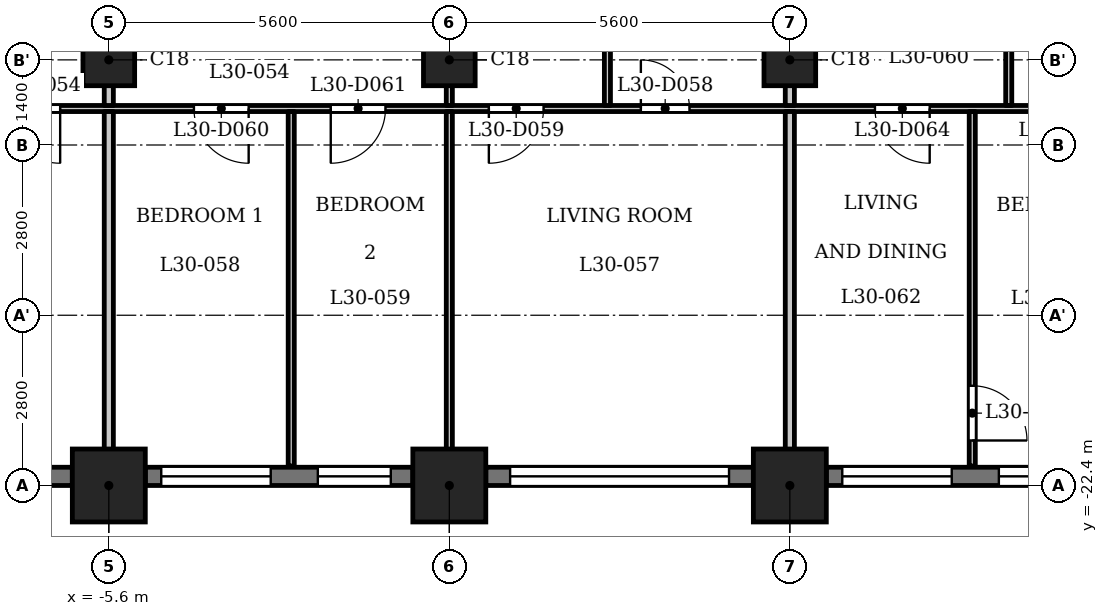
"""IFC4 building model, lengths in metres.
Left out: names, types, materials, properties, quantities, classifications, styles, units other than length and angle.
Written with IfcOpenShell. Run it as: python <this file> out.ifc"""

import sys

from ifc_helpers import new_model, si_unit, direction, frame, frame_2d, origin, origin_2d, place, context, subcontext, project, spatial, rectangle, extrude, element, fill, save


model = new_model("IFC4")
c1 = context("Model", 3, precision=1e-05, world=origin(), true_north=direction((0.0, 1.0)))
c2 = subcontext(c1, "Body", "Model", "MODEL_VIEW")
j1 = project(units=[si_unit("LENGTHUNIT", "METRE"), si_unit("PLANEANGLEUNIT", "RADIAN")], contexts=[c1])
p1 = place(None, origin())
s1 = spatial("IfcSite", under=j1, at=p1, CompositionType="ELEMENT")
p2 = place(p1, origin())
s2 = spatial("IfcBuilding", under=s1, at=p2, CompositionType="ELEMENT")
p3 = place(p2, frame((0.0, 0.0, 118.3)))
s3 = spatial("IfcBuildingStorey", under=s2, at=p3, CompositionType="ELEMENT", Elevation=118.3)
for number, where, z_axis, x_axis in (
    (1, (-5.6, -22.4, 0.0), (0.0, 0.0, 1.0), (1.0, 0.0, 0.0)),
    (2, (0.0, -22.4, 0.0), (0.0, 0.0, 1.0), (1.0, 0.0, 0.0)),
    (3, (5.6, -22.4, 0.0), (0.0, 0.0, 1.0), (1.0, 0.0, 0.0)),
):
    element("IfcColumn", number, at=place(p3, frame(where, z_axis=z_axis, x_axis=x_axis)), inside=s3, PredefinedType="COLUMN", context=c2, shape_type="SweptSolid", body=[
        extrude(rectangle(XDim=1.2, YDim=1.2, at=origin_2d()), origin(), (0.0, 0.0, 1.0), 3.5),
    ])
for number, where, z_axis, x_axis in (
    (4, (-5.6, -15.4, 0.0), (0.0, 0.0, 1.0), (1.0, 0.0, 0.0)),
    (5, (0.0, -15.4, 0.0), (0.0, 0.0, 1.0), (1.0, 0.0, 0.0)),
    (6, (5.6, -15.4, 0.0), (0.0, 0.0, 1.0), (1.0, 0.0, 0.0)),
):
    element("IfcColumn", number, at=place(p3, frame(where, z_axis=z_axis, x_axis=x_axis)), inside=s3, PredefinedType="COLUMN", context=c2, shape_type="SweptSolid", body=[
        extrude(rectangle(XDim=0.85, YDim=0.85, at=origin_2d()), origin(), (0.0, 0.0, 1.0), 3.5),
    ])
p4 = place(p3, frame((-10.6, -22.25, 0.0), z_axis=(0.0, 0.0, 1.0), x_axis=(1.0, 0.0, 0.0)))
e7 = element("IfcWall", 7, at=p4, inside=s3, PredefinedType="SOLIDWALL", context=c2, shape_type="SweptSolid", body=[
    extrude(rectangle(XDim=4.4, YDim=0.3, at=frame_2d((2.2, 0.0))), origin(), (0.0, 0.0, 1.0), 2.4),
])
p5 = place(p4, frame((0.4, 0.0, 1.2)))
e8 = element("IfcOpeningElement", 8, at=p5, cuts=e7, PredefinedType="OPENING", context=c2, shape_type="SweptSolid", body=[
    extrude(rectangle(XDim=3.6, YDim=0.95, at=frame_2d((1.8, 0.475))), frame((0.0, 0.16, 0.0), z_axis=(0.0, -1.0, 0.0), x_axis=(1.0, 0.0, 0.0)), (0.0, 0.0, 1.0), 0.32),
])
p6 = place(p3, frame((-5.0, -22.25, 0.0), z_axis=(0.0, 0.0, 1.0), x_axis=(1.0, 0.0, 0.0)))
e9 = element("IfcWall", 9, at=p6, inside=s3, PredefinedType="SOLIDWALL", context=c2, shape_type="SweptSolid", body=[
    extrude(rectangle(XDim=4.4, YDim=0.3, at=frame_2d((2.2, 0.0))), origin(), (0.0, 0.0, 1.0), 2.4),
])
p7 = place(p6, frame((0.262, 0.0, 0.9)))
e10 = element("IfcOpeningElement", 10, at=p7, cuts=e9, PredefinedType="OPENING", context=c2, shape_type="SweptSolid", body=[
    extrude(rectangle(XDim=1.8, YDim=1.25, at=frame_2d((0.9, 0.625))), frame((0.0, 0.16, 0.0), z_axis=(0.0, -1.0, 0.0), x_axis=(1.0, 0.0, 0.0)), (0.0, 0.0, 1.0), 0.32),
])
p8 = place(p6, frame((2.837, 0.0, 0.6)))
e11 = element("IfcOpeningElement", 11, at=p8, cuts=e9, PredefinedType="OPENING", context=c2, shape_type="SweptSolid", body=[
    extrude(rectangle(XDim=1.2, YDim=1.55, at=frame_2d((0.6, 0.775))), frame((0.0, 0.16, 0.0), z_axis=(0.0, -1.0, 0.0), x_axis=(1.0, 0.0, 0.0)), (0.0, 0.0, 1.0), 0.32),
])
p9 = place(p3, frame((0.6, -22.25, 0.0), z_axis=(0.0, 0.0, 1.0), x_axis=(1.0, 0.0, 0.0)))
e12 = element("IfcWall", 12, at=p9, inside=s3, PredefinedType="SOLIDWALL", context=c2, shape_type="SweptSolid", body=[
    extrude(rectangle(XDim=4.4, YDim=0.3, at=frame_2d((2.2, 0.0))), origin(), (0.0, 0.0, 1.0), 2.4),
])
p10 = place(p9, frame((0.4, 0.0, 1.2)))
e13 = element("IfcOpeningElement", 13, at=p10, cuts=e12, PredefinedType="OPENING", context=c2, shape_type="SweptSolid", body=[
    extrude(rectangle(XDim=3.6, YDim=0.95, at=frame_2d((1.8, 0.475))), frame((0.0, 0.16, 0.0), z_axis=(0.0, -1.0, 0.0), x_axis=(1.0, 0.0, 0.0)), (0.0, 0.0, 1.0), 0.32),
])
p11 = place(p3, frame((6.2, -22.25, 0.0), z_axis=(0.0, 0.0, 1.0), x_axis=(1.0, 0.0, 0.0)))
e14 = element("IfcWall", 14, at=p11, inside=s3, PredefinedType="SOLIDWALL", context=c2, shape_type="SweptSolid", body=[
    extrude(rectangle(XDim=4.4, YDim=0.3, at=frame_2d((2.2, 0.0))), origin(), (0.0, 0.0, 1.0), 2.4),
])
p12 = place(p11, frame((0.262, 0.0, 0.9)))
e15 = element("IfcOpeningElement", 15, at=p12, cuts=e14, PredefinedType="OPENING", context=c2, shape_type="SweptSolid", body=[
    extrude(rectangle(XDim=1.8, YDim=1.25, at=frame_2d((0.9, 0.625))), frame((0.0, 0.16, 0.0), z_axis=(0.0, -1.0, 0.0), x_axis=(1.0, 0.0, 0.0)), (0.0, 0.0, 1.0), 0.32),
])
p13 = place(p11, frame((2.837, 0.0, 0.6)))
e16 = element("IfcOpeningElement", 16, at=p13, cuts=e14, PredefinedType="OPENING", context=c2, shape_type="SweptSolid", body=[
    extrude(rectangle(XDim=1.2, YDim=1.55, at=frame_2d((0.6, 0.775))), frame((0.0, 0.16, 0.0), z_axis=(0.0, -1.0, 0.0), x_axis=(1.0, 0.0, 0.0)), (0.0, 0.0, 1.0), 0.32),
])
p14 = place(p3, frame((-16.725, -16.2, 0.0), z_axis=(0.0, 0.0, 1.0), x_axis=(1.0, 0.0, 0.0)))
e17 = element("IfcWall", 17, at=p14, inside=s3, PredefinedType="PARTITIONING", context=c2, shape_type="SweptSolid", body=[
    extrude(rectangle(XDim=33.45, YDim=0.1, at=frame_2d((16.725, 0.0))), origin(), (0.0, 0.0, 1.0), 3.2),
])
p15 = place(p14, frame((4.075, 0.0, 0.0)))
e18 = element("IfcOpeningElement", 18, at=p15, cuts=e17, PredefinedType="OPENING", context=c2, shape_type="SweptSolid", body=[
    extrude(rectangle(XDim=0.8, YDim=2.1, at=frame_2d((0.4, 1.05))), frame((0.0, 0.06, 0.0), z_axis=(0.0, -1.0, 0.0), x_axis=(1.0, 0.0, 0.0)), (0.0, 0.0, 1.0), 0.12),
])
p16 = place(p14, frame((9.425, 0.0, 0.0)))
e19 = element("IfcOpeningElement", 19, at=p16, cuts=e17, PredefinedType="OPENING", context=c2, shape_type="SweptSolid", body=[
    extrude(rectangle(XDim=0.9, YDim=2.1, at=frame_2d((0.45, 1.05))), frame((0.0, 0.06, 0.0), z_axis=(0.0, -1.0, 0.0), x_axis=(1.0, 0.0, 0.0)), (0.0, 0.0, 1.0), 0.12),
])
p17 = place(p14, frame((19.875, 0.0, 0.0)))
e20 = element("IfcOpeningElement", 20, at=p17, cuts=e17, PredefinedType="OPENING", context=c2, shape_type="SweptSolid", body=[
    extrude(rectangle(XDim=0.8, YDim=2.1, at=frame_2d((0.4, 1.05))), frame((0.0, 0.06, 0.0), z_axis=(0.0, -1.0, 0.0), x_axis=(1.0, 0.0, 0.0)), (0.0, 0.0, 1.0), 0.12),
])
p18 = place(p14, frame((17.375, 0.0, 0.0)))
e21 = element("IfcOpeningElement", 21, at=p18, cuts=e17, PredefinedType="OPENING", context=c2, shape_type="SweptSolid", body=[
    extrude(rectangle(XDim=0.9, YDim=2.1, at=frame_2d((0.45, 1.05))), frame((0.0, 0.06, 0.0), z_axis=(0.0, -1.0, 0.0), x_axis=(1.0, 0.0, 0.0)), (0.0, 0.0, 1.0), 0.12),
])
p19 = place(p14, frame((12.525, 0.0, 0.0)))
e22 = element("IfcOpeningElement", 22, at=p19, cuts=e17, PredefinedType="OPENING", context=c2, shape_type="SweptSolid", body=[
    extrude(rectangle(XDim=0.9, YDim=2.1, at=frame_2d((0.45, 1.05))), frame((0.0, 0.06, 0.0), z_axis=(0.0, -1.0, 0.0), x_axis=(1.0, 0.0, 0.0)), (0.0, 0.0, 1.0), 0.12),
])
p20 = place(p14, frame((14.775, 0.0, 0.0)))
e23 = element("IfcOpeningElement", 23, at=p20, cuts=e17, PredefinedType="OPENING", context=c2, shape_type="SweptSolid", body=[
    extrude(rectangle(XDim=0.9, YDim=2.1, at=frame_2d((0.45, 1.05))), frame((0.0, 0.06, 0.0), z_axis=(0.0, -1.0, 0.0), x_axis=(1.0, 0.0, 0.0)), (0.0, 0.0, 1.0), 0.12),
])
p21 = place(p14, frame((26.475, 0.0, 0.0)))
e24 = element("IfcOpeningElement", 24, at=p21, cuts=e17, PredefinedType="OPENING", context=c2, shape_type="SweptSolid", body=[
    extrude(rectangle(XDim=0.8, YDim=2.1, at=frame_2d((0.4, 1.05))), frame((0.0, 0.06, 0.0), z_axis=(0.0, -1.0, 0.0), x_axis=(1.0, 0.0, 0.0)), (0.0, 0.0, 1.0), 0.12),
])
p22 = place(p14, frame((23.725, 0.0, 0.0)))
e25 = element("IfcOpeningElement", 25, at=p22, cuts=e17, PredefinedType="OPENING", context=c2, shape_type="SweptSolid", body=[
    extrude(rectangle(XDim=0.9, YDim=2.1, at=frame_2d((0.45, 1.05))), frame((0.0, 0.06, 0.0), z_axis=(0.0, -1.0, 0.0), x_axis=(1.0, 0.0, 0.0)), (0.0, 0.0, 1.0), 0.12),
])
p23 = place(p14, frame((29.075, 0.0, 0.0)))
e26 = element("IfcOpeningElement", 26, at=p23, cuts=e17, PredefinedType="OPENING", context=c2, shape_type="SweptSolid", body=[
    extrude(rectangle(XDim=0.8, YDim=2.1, at=frame_2d((0.4, 1.05))), frame((0.0, 0.06, 0.0), z_axis=(0.0, -1.0, 0.0), x_axis=(1.0, 0.0, 0.0)), (0.0, 0.0, 1.0), 0.12),
])
p24 = place(p14, frame((30.675, 0.0, 0.0)))
e27 = element("IfcOpeningElement", 27, at=p24, cuts=e17, PredefinedType="OPENING", context=c2, shape_type="SweptSolid", body=[
    extrude(rectangle(XDim=0.9, YDim=2.1, at=frame_2d((0.45, 1.05))), frame((0.0, 0.06, 0.0), z_axis=(0.0, -1.0, 0.0), x_axis=(1.0, 0.0, 0.0)), (0.0, 0.0, 1.0), 0.12),
])
p25 = place(p3, frame((-5.6, -22.98, 0.0), z_axis=(0.0, 0.0, 1.0), x_axis=(0.0, 1.0, 0.0)))
e28 = element("IfcWall", 28, at=p25, inside=s3, PredefinedType="PARTITIONING", context=c2, shape_type="SweptSolid", body=[
    extrude(rectangle(XDim=6.73, YDim=0.15, at=frame_2d((3.365, 0.0))), origin(), (0.0, 0.0, 1.0), 3.2),
])
p26 = place(p3, frame((-5.6, -16.15, 0.0), z_axis=(0.0, 0.0, 1.0), x_axis=(0.0, 1.0, 0.0)))
e29 = element("IfcWall", 29, at=p26, inside=s3, PredefinedType="PARTITIONING", context=c2, shape_type="SweptSolid", body=[
    extrude(rectangle(XDim=2.875, YDim=0.15, at=frame_2d((1.438, 0.0))), origin(), (0.0, 0.0, 1.0), 3.2),
])
p27 = place(p3, frame((-2.6, -22.08, 0.0), z_axis=(0.0, 0.0, 1.0), x_axis=(0.0, 1.0, 0.0)))
e30 = element("IfcWall", 30, at=p27, inside=s3, PredefinedType="PARTITIONING", context=c2, shape_type="SweptSolid", body=[
    extrude(rectangle(XDim=5.83, YDim=0.1, at=frame_2d((2.915, 0.0))), origin(), (0.0, 0.0, 1.0), 3.2),
])
p28 = place(p3, frame((0.0, -22.98, 0.0), z_axis=(0.0, 0.0, 1.0), x_axis=(0.0, 1.0, 0.0)))
e31 = element("IfcWall", 31, at=p28, inside=s3, PredefinedType="PARTITIONING", context=c2, shape_type="SweptSolid", body=[
    extrude(rectangle(XDim=6.73, YDim=0.1, at=frame_2d((3.365, 0.0))), origin(), (0.0, 0.0, 1.0), 3.2),
])
p29 = place(p3, frame((0.0, -16.15, 0.0), z_axis=(0.0, 0.0, 1.0), x_axis=(0.0, 1.0, 0.0)))
e32 = element("IfcWall", 32, at=p29, inside=s3, PredefinedType="PARTITIONING", context=c2, shape_type="SweptSolid", body=[
    extrude(rectangle(XDim=2.875, YDim=0.1, at=frame_2d((1.438, 0.0))), origin(), (0.0, 0.0, 1.0), 3.2),
])
p30 = place(p29, frame((1.35, 0.0, 0.0)))
e33 = element("IfcOpeningElement", 33, at=p30, cuts=e32, PredefinedType="OPENING", context=c2, shape_type="SweptSolid", body=[
    extrude(rectangle(XDim=0.9, YDim=2.1, at=frame_2d((0.45, 1.05))), frame((0.0, 0.06, 0.0), z_axis=(0.0, -1.0, 0.0), x_axis=(1.0, 0.0, 0.0)), (0.0, 0.0, 1.0), 0.12),
])
p31 = place(p3, frame((2.6, -16.15, 0.0), z_axis=(0.0, 0.0, 1.0), x_axis=(0.0, 1.0, 0.0)))
e34 = element("IfcWall", 34, at=p31, inside=s3, PredefinedType="PARTITIONING", context=c2, shape_type="SweptSolid", body=[
    extrude(rectangle(XDim=2.875, YDim=0.1, at=frame_2d((1.438, 0.0))), origin(), (0.0, 0.0, 1.0), 3.2),
])
p32 = place(p3, frame((5.6, -22.98, 0.0), z_axis=(0.0, 0.0, 1.0), x_axis=(0.0, 1.0, 0.0)))
e35 = element("IfcWall", 35, at=p32, inside=s3, PredefinedType="PARTITIONING", context=c2, shape_type="SweptSolid", body=[
    extrude(rectangle(XDim=6.73, YDim=0.15, at=frame_2d((3.365, 0.0))), origin(), (0.0, 0.0, 1.0), 3.2),
])
p33 = place(p3, frame((5.6, -16.15, 0.0), z_axis=(0.0, 0.0, 1.0), x_axis=(0.0, 1.0, 0.0)))
e36 = element("IfcWall", 36, at=p33, inside=s3, PredefinedType="PARTITIONING", context=c2, shape_type="SweptSolid", body=[
    extrude(rectangle(XDim=2.875, YDim=0.15, at=frame_2d((1.438, 0.0))), origin(), (0.0, 0.0, 1.0), 3.2),
])
p34 = place(p3, frame((8.6, -22.08, 0.0), z_axis=(0.0, 0.0, 1.0), x_axis=(0.0, 1.0, 0.0)))
e37 = element("IfcWall", 37, at=p34, inside=s3, PredefinedType="PARTITIONING", context=c2, shape_type="SweptSolid", body=[
    extrude(rectangle(XDim=5.83, YDim=0.1, at=frame_2d((2.915, 0.0))), origin(), (0.0, 0.0, 1.0), 3.2),
])
p35 = place(p34, frame((0.42, 0.0, 0.0)))
e38 = element("IfcOpeningElement", 38, at=p35, cuts=e37, PredefinedType="OPENING", context=c2, shape_type="SweptSolid", body=[
    extrude(rectangle(XDim=0.9, YDim=2.1, at=frame_2d((0.45, 1.05))), frame((0.0, 0.06, 0.0), z_axis=(0.0, -1.0, 0.0), x_axis=(1.0, 0.0, 0.0)), (0.0, 0.0, 1.0), 0.12),
])
p36 = place(p3, frame((9.2, -16.15, 0.0), z_axis=(0.0, 0.0, 1.0), x_axis=(0.0, 1.0, 0.0)))
e39 = element("IfcWall", 39, at=p36, inside=s3, PredefinedType="PARTITIONING", context=c2, shape_type="SweptSolid", body=[
    extrude(rectangle(XDim=2.875, YDim=0.1, at=frame_2d((1.438, 0.0))), origin(), (0.0, 0.0, 1.0), 3.2),
])
p37 = place(p16, origin())
e40 = element("IfcDoor", 40, at=p37, inside=s3, OperationType="SINGLE_SWING_RIGHT", PredefinedType="DOOR", context=c2, shape_type="SweptSolid", body=[
    extrude(rectangle(XDim=0.9, YDim=2.1, at=frame_2d((0.45, 1.05))), frame((0.0, 0.025, 0.0), z_axis=(0.0, -1.0, 0.0), x_axis=(1.0, 0.0, 0.0)), (0.0, 0.0, 1.0), 0.05),
])
fill(e19, e40)
p38 = place(p17, origin())
e41 = element("IfcDoor", 41, at=p38, inside=s3, OperationType="SINGLE_SWING_RIGHT", PredefinedType="DOOR", context=c2, shape_type="SweptSolid", body=[
    extrude(rectangle(XDim=0.8, YDim=2.1, at=frame_2d((0.4, 1.05))), frame((0.0, 0.025, 0.0), z_axis=(0.0, -1.0, 0.0), x_axis=(1.0, 0.0, 0.0)), (0.0, 0.0, 1.0), 0.05),
])
fill(e20, e41)
p39 = place(p18, origin())
e42 = element("IfcDoor", 42, at=p39, inside=s3, OperationType="SINGLE_SWING_LEFT", PredefinedType="DOOR", context=c2, shape_type="SweptSolid", body=[
    extrude(rectangle(XDim=0.9, YDim=2.1, at=frame_2d((0.45, 1.05))), frame((0.0, 0.025, 0.0), z_axis=(0.0, -1.0, 0.0), x_axis=(1.0, 0.0, 0.0)), (0.0, 0.0, 1.0), 0.05),
])
fill(e21, e42)
p40 = place(p19, origin())
e43 = element("IfcDoor", 43, at=p40, inside=s3, OperationType="SINGLE_SWING_RIGHT", PredefinedType="DOOR", context=c2, shape_type="SweptSolid", body=[
    extrude(rectangle(XDim=0.9, YDim=2.1, at=frame_2d((0.45, 1.05))), frame((0.0, 0.025, 0.0), z_axis=(0.0, -1.0, 0.0), x_axis=(1.0, 0.0, 0.0)), (0.0, 0.0, 1.0), 0.05),
])
fill(e22, e43)
p41 = place(p20, origin())
e44 = element("IfcDoor", 44, at=p41, inside=s3, OperationType="SINGLE_SWING_LEFT", PredefinedType="DOOR", context=c2, shape_type="SweptSolid", body=[
    extrude(rectangle(XDim=0.9, YDim=2.1, at=frame_2d((0.45, 1.05))), frame((0.0, 0.025, 0.0), z_axis=(0.0, -1.0, 0.0), x_axis=(1.0, 0.0, 0.0)), (0.0, 0.0, 1.0), 0.05),
])
fill(e23, e44)
p42 = place(p22, origin())
e45 = element("IfcDoor", 45, at=p42, inside=s3, OperationType="SINGLE_SWING_RIGHT", PredefinedType="DOOR", context=c2, shape_type="SweptSolid", body=[
    extrude(rectangle(XDim=0.9, YDim=2.1, at=frame_2d((0.45, 1.05))), frame((0.0, 0.025, 0.0), z_axis=(0.0, -1.0, 0.0), x_axis=(1.0, 0.0, 0.0)), (0.0, 0.0, 1.0), 0.05),
])
fill(e25, e45)
p43 = place(p35, origin())
e46 = element("IfcDoor", 46, at=p43, inside=s3, OperationType="SINGLE_SWING_LEFT", PredefinedType="DOOR", context=c2, shape_type="SweptSolid", body=[
    extrude(rectangle(XDim=0.9, YDim=2.1, at=frame_2d((0.45, 1.05))), frame((0.0, 0.025, 0.0), z_axis=(0.0, -1.0, 0.0), x_axis=(1.0, 0.0, 0.0)), (0.0, 0.0, 1.0), 0.05),
])
fill(e38, e46)
p44 = place(p7, origin())
e47 = element("IfcWindow", 47, at=p44, inside=s3, PartitioningType="SINGLE_PANEL", PredefinedType="WINDOW", context=c2, shape_type="SweptSolid", body=[
    extrude(rectangle(XDim=1.8, YDim=1.25, at=frame_2d((0.9, 0.625))), frame((0.0, 0.03, 0.0), z_axis=(0.0, -1.0, 0.0), x_axis=(1.0, 0.0, 0.0)), (0.0, 0.0, 1.0), 0.06),
])
fill(e10, e47)
p45 = place(p8, origin())
e48 = element("IfcWindow", 48, at=p45, inside=s3, PartitioningType="SINGLE_PANEL", PredefinedType="WINDOW", context=c2, shape_type="SweptSolid", body=[
    extrude(rectangle(XDim=1.2, YDim=1.55, at=frame_2d((0.6, 0.775))), frame((0.0, 0.03, 0.0), z_axis=(0.0, -1.0, 0.0), x_axis=(1.0, 0.0, 0.0)), (0.0, 0.0, 1.0), 0.06),
])
fill(e11, e48)
p46 = place(p10, origin())
e49 = element("IfcWindow", 49, at=p46, inside=s3, PartitioningType="SINGLE_PANEL", PredefinedType="WINDOW", context=c2, shape_type="SweptSolid", body=[
    extrude(rectangle(XDim=3.6, YDim=0.95, at=frame_2d((1.8, 0.475))), frame((0.0, 0.03, 0.0), z_axis=(0.0, -1.0, 0.0), x_axis=(1.0, 0.0, 0.0)), (0.0, 0.0, 1.0), 0.06),
])
fill(e13, e49)
p47 = place(p12, origin())
e50 = element("IfcWindow", 50, at=p47, inside=s3, PartitioningType="SINGLE_PANEL", PredefinedType="WINDOW", context=c2, shape_type="SweptSolid", body=[
    extrude(rectangle(XDim=1.8, YDim=1.25, at=frame_2d((0.9, 0.625))), frame((0.0, 0.03, 0.0), z_axis=(0.0, -1.0, 0.0), x_axis=(1.0, 0.0, 0.0)), (0.0, 0.0, 1.0), 0.06),
])
fill(e15, e50)
p48 = place(p13, origin())
e51 = element("IfcWindow", 51, at=p48, inside=s3, PartitioningType="SINGLE_PANEL", PredefinedType="WINDOW", context=c2, shape_type="SweptSolid", body=[
    extrude(rectangle(XDim=1.2, YDim=1.55, at=frame_2d((0.6, 0.775))), frame((0.0, 0.03, 0.0), z_axis=(0.0, -1.0, 0.0), x_axis=(1.0, 0.0, 0.0)), (0.0, 0.0, 1.0), 0.06),
])
fill(e16, e51)
save(model, sys.argv[1])
